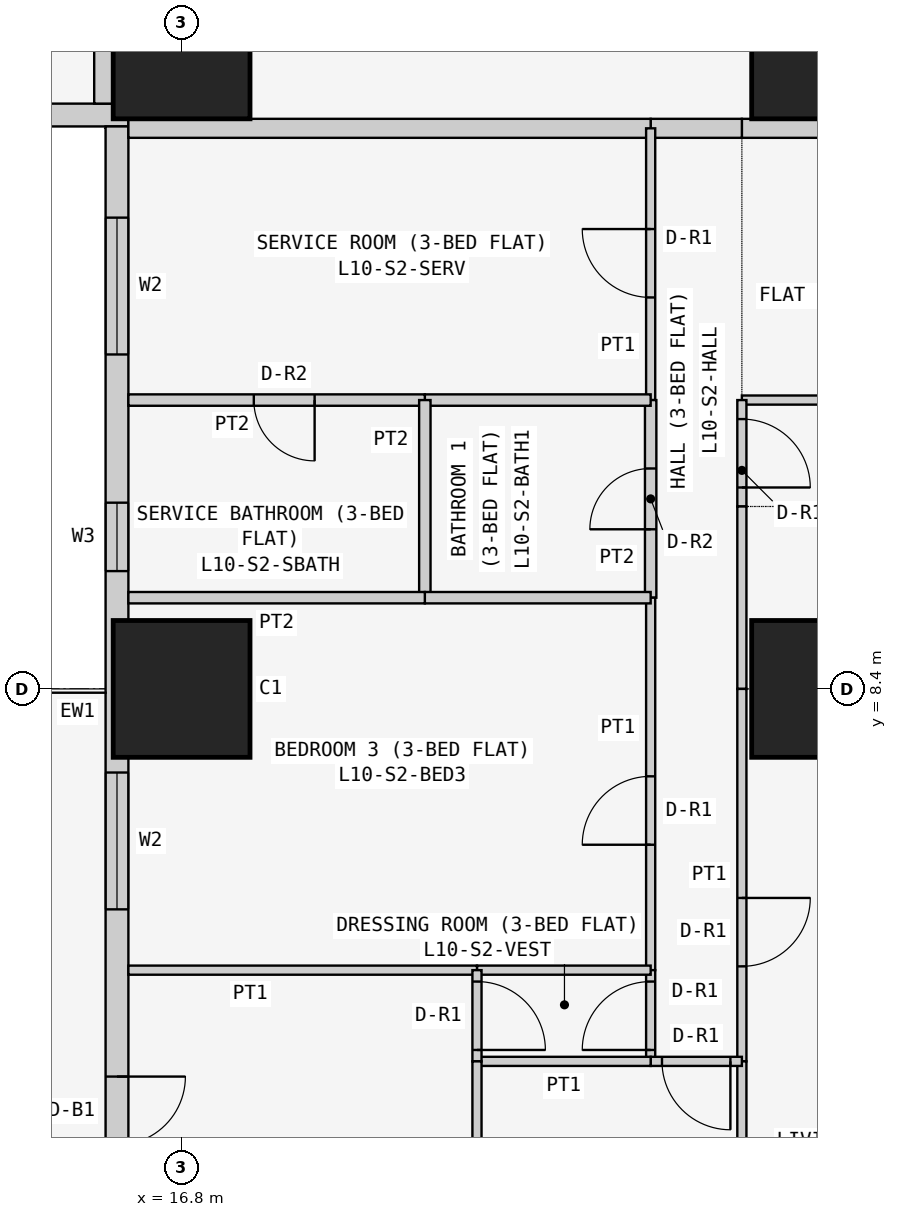
"""IFC4 building model, lengths in metres.
Left out: names, types, materials, properties, quantities, classifications, styles, units other than length and angle.
Written with IfcOpenShell. Run it as: python <this file> out.ifc"""

import sys

from ifc_helpers import new_model, si_unit, direction, frame, frame_2d, origin, origin_2d, place, context, subcontext, project, spatial, rectangle, extrude, element, fill, save


model = new_model("IFC4")
c1 = context("Model", 3, precision=1e-05, world=origin(), true_north=direction((0.0, 1.0)))
c2 = subcontext(c1, "Body", "Model", "MODEL_VIEW")
j1 = project(units=[si_unit("LENGTHUNIT", "METRE"), si_unit("PLANEANGLEUNIT", "RADIAN")], contexts=[c1])
p1 = place(None, origin())
s1 = spatial("IfcSite", under=j1, at=p1, CompositionType="ELEMENT")
p2 = place(p1, origin())
s2 = spatial("IfcBuilding", under=s1, at=p2, CompositionType="ELEMENT")
p3 = place(p2, frame((0.0, 0.0, 45.3)))
s3 = spatial("IfcBuildingStorey", under=s2, at=p3, CompositionType="ELEMENT", Elevation=45.3)
for number, where, z_axis, x_axis in (
    (1, (16.8, 8.4, 0.0), (0.0, 0.0, 1.0), (1.0, 0.0, 0.0)),
    (2, (16.8, 16.8, 0.0), (0.0, 0.0, 1.0), (1.0, 0.0, 0.0)),
    (3, (25.2, 8.4, 0.0), (0.0, 0.0, 1.0), (1.0, 0.0, 0.0)),
    (4, (25.2, 16.8, 0.0), (0.0, 0.0, 1.0), (1.0, 0.0, 0.0)),
):
    element("IfcColumn", number, at=place(p3, frame(where, z_axis=z_axis, x_axis=x_axis)), inside=s3, PredefinedType="COLUMN", context=c2, shape_type="SweptSolid", body=[
        extrude(rectangle(XDim=1.8, YDim=1.8, at=origin_2d()), origin(), (0.0, 0.0, 1.0), 3.6),
    ])
p4 = place(p3, frame((0.4, 15.95, 0.0), z_axis=(0.0, 0.0, 1.0), x_axis=(1.0, 0.0, 0.0)))
e5 = element("IfcWall", 5, at=p4, inside=s3, PredefinedType="SOLIDWALL", context=c2, shape_type="SweptSolid", body=[
    extrude(rectangle(XDim=15.7, YDim=0.3, at=frame_2d((7.85, 0.0))), origin(), (0.0, 0.0, 1.0), 3.45),
])
p5 = place(p4, frame((12.4, 0.0, 0.9)))
e6 = element("IfcOpeningElement", 6, at=p5, cuts=e5, PredefinedType="OPENING", context=c2, shape_type="SweptSolid", body=[
    extrude(rectangle(XDim=1.8, YDim=1.5, at=frame_2d((0.9, 0.75))), frame((0.0, 0.16, 0.0), z_axis=(0.0, -1.0, 0.0), x_axis=(1.0, 0.0, 0.0)), (0.0, 0.0, 1.0), 0.32),
])
p6 = place(p4, frame((9.55, 0.0, 1.5)))
e7 = element("IfcOpeningElement", 7, at=p6, cuts=e5, PredefinedType="OPENING", context=c2, shape_type="SweptSolid", body=[
    extrude(rectangle(XDim=0.9, YDim=0.7, at=frame_2d((0.45, 0.35))), frame((0.0, 0.16, 0.0), z_axis=(0.0, -1.0, 0.0), x_axis=(1.0, 0.0, 0.0)), (0.0, 0.0, 1.0), 0.32),
])
p7 = place(p4, frame((5.1, 0.0, 0.9)))
e8 = element("IfcOpeningElement", 8, at=p7, cuts=e5, PredefinedType="OPENING", context=c2, shape_type="SweptSolid", body=[
    extrude(rectangle(XDim=1.8, YDim=1.5, at=frame_2d((0.9, 0.75))), frame((0.0, 0.16, 0.0), z_axis=(0.0, -1.0, 0.0), x_axis=(1.0, 0.0, 0.0)), (0.0, 0.0, 1.0), 0.32),
])
p8 = place(p4, frame((2.0, 0.0, 0.0)))
e9 = element("IfcOpeningElement", 9, at=p8, cuts=e5, PredefinedType="OPENING", context=c2, shape_type="SweptSolid", body=[
    extrude(rectangle(XDim=0.9, YDim=2.4, at=frame_2d((0.45, 1.2))), frame((0.0, 0.16, 0.0), z_axis=(0.0, -1.0, 0.0), x_axis=(1.0, 0.0, 0.0)), (0.0, 0.0, 1.0), 0.32),
])
p9 = place(p4, frame((0.7, 0.0, 0.9)))
e10 = element("IfcOpeningElement", 10, at=p9, cuts=e5, PredefinedType="OPENING", context=c2, shape_type="SweptSolid", body=[
    extrude(rectangle(XDim=1.2, YDim=1.5, at=frame_2d((0.6, 0.75))), frame((0.0, 0.16, 0.0), z_axis=(0.0, -1.0, 0.0), x_axis=(1.0, 0.0, 0.0)), (0.0, 0.0, 1.0), 0.32),
])
p10 = place(p3, frame((15.95, 15.8, 0.0), z_axis=(0.0, 0.0, 1.0), x_axis=(0.0, -1.0, 0.0)))
e11 = element("IfcWall", 11, at=p10, inside=s3, PredefinedType="SOLIDWALL", context=c2, shape_type="SweptSolid", body=[
    extrude(rectangle(XDim=15.4, YDim=0.3, at=frame_2d((7.7, 0.0))), origin(), (0.0, 0.0, 1.0), 3.45),
])
p11 = place(p10, frame((1.2, 0.0, 0.9)))
e12 = element("IfcOpeningElement", 12, at=p11, cuts=e11, PredefinedType="OPENING", context=c2, shape_type="SweptSolid", body=[
    extrude(rectangle(XDim=1.8, YDim=1.5, at=frame_2d((0.9, 0.75))), frame((0.0, 0.16, 0.0), z_axis=(0.0, -1.0, 0.0), x_axis=(1.0, 0.0, 0.0)), (0.0, 0.0, 1.0), 0.32),
])
p12 = place(p10, frame((4.95, 0.0, 1.5)))
e13 = element("IfcOpeningElement", 13, at=p12, cuts=e11, PredefinedType="OPENING", context=c2, shape_type="SweptSolid", body=[
    extrude(rectangle(XDim=0.9, YDim=0.7, at=frame_2d((0.45, 0.35))), frame((0.0, 0.16, 0.0), z_axis=(0.0, -1.0, 0.0), x_axis=(1.0, 0.0, 0.0)), (0.0, 0.0, 1.0), 0.32),
])
p13 = place(p10, frame((8.5, 0.0, 0.9)))
e14 = element("IfcOpeningElement", 14, at=p13, cuts=e11, PredefinedType="OPENING", context=c2, shape_type="SweptSolid", body=[
    extrude(rectangle(XDim=1.8, YDim=1.5, at=frame_2d((0.9, 0.75))), frame((0.0, 0.16, 0.0), z_axis=(0.0, -1.0, 0.0), x_axis=(1.0, 0.0, 0.0)), (0.0, 0.0, 1.0), 0.32),
])
p14 = place(p10, frame((12.5, 0.0, 0.0)))
e15 = element("IfcOpeningElement", 15, at=p14, cuts=e11, PredefinedType="OPENING", context=c2, shape_type="SweptSolid", body=[
    extrude(rectangle(XDim=0.9, YDim=2.4, at=frame_2d((0.45, 1.2))), frame((0.0, 0.16, 0.0), z_axis=(0.0, -1.0, 0.0), x_axis=(1.0, 0.0, 0.0)), (0.0, 0.0, 1.0), 0.32),
])
p15 = place(p10, frame((13.5, 0.0, 0.9)))
e16 = element("IfcOpeningElement", 16, at=p15, cuts=e11, PredefinedType="OPENING", context=c2, shape_type="SweptSolid", body=[
    extrude(rectangle(XDim=1.2, YDim=1.5, at=frame_2d((0.6, 0.75))), frame((0.0, 0.16, 0.0), z_axis=(0.0, -1.0, 0.0), x_axis=(1.0, 0.0, 0.0)), (0.0, 0.0, 1.0), 0.32),
])
p16 = place(p3, frame((29.4, 15.775, 0.0), z_axis=(0.0, 0.0, 1.0), x_axis=(-1.0, 0.0, 0.0)))
e17 = element("IfcWall", 17, at=p16, inside=s3, PredefinedType="PARTITIONING", context=c2, shape_type="SweptSolid", body=[
    extrude(rectangle(XDim=5.229, YDim=0.25, at=frame_2d((2.615, 0.0))), origin(), (0.0, 0.0, 1.0), 3.45),
])
p17 = place(p16, frame((2.1, 0.0, 0.0)))
e18 = element("IfcOpeningElement", 18, at=p17, cuts=e17, PredefinedType="OPENING", context=c2, shape_type="SweptSolid", body=[
    extrude(rectangle(XDim=1.0, YDim=2.1, at=frame_2d((0.5, 1.05))), frame((0.0, 0.135, 0.0), z_axis=(0.0, -1.0, 0.0), x_axis=(1.0, 0.0, 0.0)), (0.0, 0.0, 1.0), 0.27),
])
p18 = place(p3, frame((24.171, 15.775, 0.0), z_axis=(0.0, 0.0, 1.0), x_axis=(-1.0, 0.0, 0.0)))
e19 = element("IfcWall", 19, at=p18, inside=s3, PredefinedType="PARTITIONING", context=c2, shape_type="SweptSolid", body=[
    extrude(rectangle(XDim=1.2, YDim=0.25, at=frame_2d((0.6, 0.0))), origin(), (0.0, 0.0, 1.0), 3.45),
])
for number, where, z_axis, x_axis in (
    (20, (22.971, 15.775, 0.0), (0.0, 0.0, 1.0), (-1.0, 0.0, 0.0)),
    (21, (15.775, 16.1, 0.0), (0.0, 0.0, 1.0), (0.0, 1.0, 0.0)),
):
    element("IfcWall", number, at=place(p3, frame(where, z_axis=z_axis, x_axis=x_axis)), inside=s3, PredefinedType="PARTITIONING", context=c2, shape_type="SweptSolid", body=[
        extrude(rectangle(XDim=6.871, YDim=0.25, at=frame_2d((3.436, 0.0))), origin(), (0.0, 0.0, 1.0), 3.45),
    ])
p19 = place(p3, frame((29.4, 12.2, 0.0), z_axis=(0.0, 0.0, 1.0), x_axis=(-1.0, 0.0, 0.0)))
e22 = element("IfcWall", 22, at=p19, inside=s3, PredefinedType="PARTITIONING", context=c2, shape_type="SweptSolid", body=[
    extrude(rectangle(XDim=5.229, YDim=0.12, at=frame_2d((2.615, 0.0))), origin(), (0.0, 0.0, 1.0), 3.45),
])
p20 = place(p3, frame((24.171, 10.8, 0.0), z_axis=(0.0, 0.0, 1.0), x_axis=(0.0, 1.0, 0.0)))
e23 = element("IfcWall", 23, at=p20, inside=s3, PredefinedType="PARTITIONING", context=c2, shape_type="SweptSolid", body=[
    extrude(rectangle(XDim=1.4, YDim=0.12, at=frame_2d((0.7, 0.0))), origin(), (0.0, 0.0, 1.0), 3.45),
])
p21 = place(p20, frame((0.25, 0.0, 0.0)))
e24 = element("IfcOpeningElement", 24, at=p21, cuts=e23, PredefinedType="OPENING", context=c2, shape_type="SweptSolid", body=[
    extrude(rectangle(XDim=0.9, YDim=2.1, at=frame_2d((0.45, 1.05))), frame((0.0, 0.07, 0.0), z_axis=(0.0, -1.0, 0.0), x_axis=(1.0, 0.0, 0.0)), (0.0, 0.0, 1.0), 0.14),
])
p22 = place(p3, frame((24.171, 8.4, 0.0), z_axis=(0.0, 0.0, 1.0), x_axis=(0.0, 1.0, 0.0)))
e25 = element("IfcWall", 25, at=p22, inside=s3, PredefinedType="PARTITIONING", context=c2, shape_type="SweptSolid", body=[
    extrude(rectangle(XDim=2.4, YDim=0.12, at=frame_2d((1.2, 0.0))), origin(), (0.0, 0.0, 1.0), 3.45),
])
p23 = place(p3, frame((24.171, 3.5, 0.0), z_axis=(0.0, 0.0, 1.0), x_axis=(0.0, 1.0, 0.0)))
e26 = element("IfcWall", 26, at=p23, inside=s3, PredefinedType="PARTITIONING", context=c2, shape_type="SweptSolid", body=[
    extrude(rectangle(XDim=4.9, YDim=0.12, at=frame_2d((2.45, 0.0))), origin(), (0.0, 0.0, 1.0), 3.45),
])
p24 = place(p23, frame((1.25, 0.0, 0.0)))
e27 = element("IfcOpeningElement", 27, at=p24, cuts=e26, PredefinedType="OPENING", context=c2, shape_type="SweptSolid", body=[
    extrude(rectangle(XDim=0.9, YDim=2.1, at=frame_2d((0.45, 1.05))), frame((0.0, 0.07, 0.0), z_axis=(0.0, -1.0, 0.0), x_axis=(1.0, 0.0, 0.0)), (0.0, 0.0, 1.0), 0.14),
])
p25 = place(p3, frame((24.171, -0.65, 0.0), z_axis=(0.0, 0.0, 1.0), x_axis=(0.0, 1.0, 0.0)))
e28 = element("IfcWall", 28, at=p25, inside=s3, PredefinedType="PARTITIONING", context=c2, shape_type="SweptSolid", body=[
    extrude(rectangle(XDim=4.15, YDim=0.12, at=frame_2d((2.075, 0.0))), origin(), (0.0, 0.0, 1.0), 3.45),
])
p26 = place(p3, frame((22.971, 12.2, 0.0), z_axis=(0.0, 0.0, 1.0), x_axis=(0.0, 1.0, 0.0)))
e29 = element("IfcWall", 29, at=p26, inside=s3, PredefinedType="PARTITIONING", context=c2, shape_type="SweptSolid", body=[
    extrude(rectangle(XDim=3.575, YDim=0.12, at=frame_2d((1.788, 0.0))), origin(), (0.0, 0.0, 1.0), 3.45),
])
p27 = place(p26, frame((1.35, 0.0, 0.0)))
e30 = element("IfcOpeningElement", 30, at=p27, cuts=e29, PredefinedType="OPENING", context=c2, shape_type="SweptSolid", body=[
    extrude(rectangle(XDim=0.9, YDim=2.1, at=frame_2d((0.45, 1.05))), frame((0.0, 0.07, 0.0), z_axis=(0.0, -1.0, 0.0), x_axis=(1.0, 0.0, 0.0)), (0.0, 0.0, 1.0), 0.14),
])
p28 = place(p3, frame((22.971, 9.6, 0.0), z_axis=(0.0, 0.0, 1.0), x_axis=(0.0, 1.0, 0.0)))
e31 = element("IfcWall", 31, at=p28, inside=s3, PredefinedType="PARTITIONING", context=c2, shape_type="SweptSolid", body=[
    extrude(rectangle(XDim=2.6, YDim=0.15, at=frame_2d((1.3, 0.0))), origin(), (0.0, 0.0, 1.0), 3.45),
])
p29 = place(p28, frame((0.9, 0.0, 0.0)))
e32 = element("IfcOpeningElement", 32, at=p29, cuts=e31, PredefinedType="OPENING", context=c2, shape_type="SweptSolid", body=[
    extrude(rectangle(XDim=0.8, YDim=2.1, at=frame_2d((0.4, 1.05))), frame((0.0, 0.085, 0.0), z_axis=(0.0, -1.0, 0.0), x_axis=(1.0, 0.0, 0.0)), (0.0, 0.0, 1.0), 0.17),
])
p30 = place(p3, frame((22.971, 4.7, 0.0), z_axis=(0.0, 0.0, 1.0), x_axis=(0.0, 1.0, 0.0)))
e33 = element("IfcWall", 33, at=p30, inside=s3, PredefinedType="PARTITIONING", context=c2, shape_type="SweptSolid", body=[
    extrude(rectangle(XDim=4.9, YDim=0.12, at=frame_2d((2.45, 0.0))), origin(), (0.0, 0.0, 1.0), 3.45),
])
p31 = place(p30, frame((1.65, 0.0, 0.0)))
e34 = element("IfcOpeningElement", 34, at=p31, cuts=e33, PredefinedType="OPENING", context=c2, shape_type="SweptSolid", body=[
    extrude(rectangle(XDim=0.9, YDim=2.1, at=frame_2d((0.45, 1.05))), frame((0.0, 0.07, 0.0), z_axis=(0.0, -1.0, 0.0), x_axis=(1.0, 0.0, 0.0)), (0.0, 0.0, 1.0), 0.14),
])
p32 = place(p3, frame((22.971, 3.5, 0.0), z_axis=(0.0, 0.0, 1.0), x_axis=(0.0, 1.0, 0.0)))
e35 = element("IfcWall", 35, at=p32, inside=s3, PredefinedType="PARTITIONING", context=c2, shape_type="SweptSolid", body=[
    extrude(rectangle(XDim=1.2, YDim=0.12, at=frame_2d((0.6, 0.0))), origin(), (0.0, 0.0, 1.0), 3.45),
])
p33 = place(p32, frame((0.15, 0.0, 0.0)))
e36 = element("IfcOpeningElement", 36, at=p33, cuts=e35, PredefinedType="OPENING", context=c2, shape_type="SweptSolid", body=[
    extrude(rectangle(XDim=0.9, YDim=2.1, at=frame_2d((0.45, 1.05))), frame((0.0, 0.07, 0.0), z_axis=(0.0, -1.0, 0.0), x_axis=(1.0, 0.0, 0.0)), (0.0, 0.0, 1.0), 0.14),
])
p34 = place(p3, frame((24.171, 3.5, 0.0), z_axis=(0.0, 0.0, 1.0), x_axis=(-1.0, 0.0, 0.0)))
e37 = element("IfcWall", 37, at=p34, inside=s3, PredefinedType="PARTITIONING", context=c2, shape_type="SweptSolid", body=[
    extrude(rectangle(XDim=1.2, YDim=0.12, at=frame_2d((0.6, 0.0))), origin(), (0.0, 0.0, 1.0), 3.45),
])
p35 = place(p34, frame((0.151, 0.0, 0.0)))
e38 = element("IfcOpeningElement", 38, at=p35, cuts=e37, PredefinedType="OPENING", context=c2, shape_type="SweptSolid", body=[
    extrude(rectangle(XDim=0.9, YDim=2.1, at=frame_2d((0.45, 1.05))), frame((0.0, 0.07, 0.0), z_axis=(0.0, -1.0, 0.0), x_axis=(1.0, 0.0, 0.0)), (0.0, 0.0, 1.0), 0.14),
])
p36 = place(p3, frame((22.971, 12.2, 0.0), z_axis=(0.0, 0.0, 1.0), x_axis=(-1.0, 0.0, 0.0)))
e39 = element("IfcWall", 39, at=p36, inside=s3, PredefinedType="PARTITIONING", context=c2, shape_type="SweptSolid", body=[
    extrude(rectangle(XDim=2.971, YDim=0.15, at=frame_2d((1.485, 0.0))), origin(), (0.0, 0.0, 1.0), 3.45),
])
p37 = place(p3, frame((20.0, 12.2, 0.0), z_axis=(0.0, 0.0, 1.0), x_axis=(-1.0, 0.0, 0.0)))
e40 = element("IfcWall", 40, at=p37, inside=s3, PredefinedType="PARTITIONING", context=c2, shape_type="SweptSolid", body=[
    extrude(rectangle(XDim=3.9, YDim=0.15, at=frame_2d((1.95, 0.0))), origin(), (0.0, 0.0, 1.0), 3.45),
])
p38 = place(p37, frame((1.45, 0.0, 0.0)))
e41 = element("IfcOpeningElement", 41, at=p38, cuts=e40, PredefinedType="OPENING", context=c2, shape_type="SweptSolid", body=[
    extrude(rectangle(XDim=0.8, YDim=2.1, at=frame_2d((0.4, 1.05))), frame((0.0, 0.085, 0.0), z_axis=(0.0, -1.0, 0.0), x_axis=(1.0, 0.0, 0.0)), (0.0, 0.0, 1.0), 0.17),
])
p39 = place(p3, frame((20.0, 9.6, 0.0), z_axis=(0.0, 0.0, 1.0), x_axis=(0.0, 1.0, 0.0)))
e42 = element("IfcWall", 42, at=p39, inside=s3, PredefinedType="PARTITIONING", context=c2, shape_type="SweptSolid", body=[
    extrude(rectangle(XDim=2.6, YDim=0.15, at=frame_2d((1.3, 0.0))), origin(), (0.0, 0.0, 1.0), 3.45),
])
p40 = place(p3, frame((22.971, 9.6, 0.0), z_axis=(0.0, 0.0, 1.0), x_axis=(-1.0, 0.0, 0.0)))
e43 = element("IfcWall", 43, at=p40, inside=s3, PredefinedType="PARTITIONING", context=c2, shape_type="SweptSolid", body=[
    extrude(rectangle(XDim=2.971, YDim=0.15, at=frame_2d((1.485, 0.0))), origin(), (0.0, 0.0, 1.0), 3.45),
])
p41 = place(p3, frame((20.0, 9.6, 0.0), z_axis=(0.0, 0.0, 1.0), x_axis=(-1.0, 0.0, 0.0)))
e44 = element("IfcWall", 44, at=p41, inside=s3, PredefinedType="PARTITIONING", context=c2, shape_type="SweptSolid", body=[
    extrude(rectangle(XDim=3.9, YDim=0.15, at=frame_2d((1.95, 0.0))), origin(), (0.0, 0.0, 1.0), 3.45),
])
p42 = place(p3, frame((22.971, 4.7, 0.0), z_axis=(0.0, 0.0, 1.0), x_axis=(-1.0, 0.0, 0.0)))
e45 = element("IfcWall", 45, at=p42, inside=s3, PredefinedType="PARTITIONING", context=c2, shape_type="SweptSolid", body=[
    extrude(rectangle(XDim=2.285, YDim=0.12, at=frame_2d((1.143, 0.0))), origin(), (0.0, 0.0, 1.0), 3.45),
])
p43 = place(p3, frame((20.686, 4.7, 0.0), z_axis=(0.0, 0.0, 1.0), x_axis=(-1.0, 0.0, 0.0)))
e46 = element("IfcWall", 46, at=p43, inside=s3, PredefinedType="PARTITIONING", context=c2, shape_type="SweptSolid", body=[
    extrude(rectangle(XDim=4.586, YDim=0.12, at=frame_2d((2.293, 0.0))), origin(), (0.0, 0.0, 1.0), 3.45),
])
p44 = place(p3, frame((22.971, 3.5, 0.0), z_axis=(0.0, 0.0, 1.0), x_axis=(-1.0, 0.0, 0.0)))
e47 = element("IfcWall", 47, at=p44, inside=s3, PredefinedType="PARTITIONING", context=c2, shape_type="SweptSolid", body=[
    extrude(rectangle(XDim=2.285, YDim=0.12, at=frame_2d((1.143, 0.0))), origin(), (0.0, 0.0, 1.0), 3.45),
])
p45 = place(p3, frame((20.686, 3.5, 0.0), z_axis=(0.0, 0.0, 1.0), x_axis=(0.0, 1.0, 0.0)))
e48 = element("IfcWall", 48, at=p45, inside=s3, PredefinedType="PARTITIONING", context=c2, shape_type="SweptSolid", body=[
    extrude(rectangle(XDim=1.2, YDim=0.12, at=frame_2d((0.6, 0.0))), origin(), (0.0, 0.0, 1.0), 3.45),
])
p46 = place(p45, frame((0.15, 0.0, 0.0)))
e49 = element("IfcOpeningElement", 49, at=p46, cuts=e48, PredefinedType="OPENING", context=c2, shape_type="SweptSolid", body=[
    extrude(rectangle(XDim=0.9, YDim=2.1, at=frame_2d((0.45, 1.05))), frame((0.0, 0.07, 0.0), z_axis=(0.0, -1.0, 0.0), x_axis=(1.0, 0.0, 0.0)), (0.0, 0.0, 1.0), 0.14),
])
p47 = place(p3, frame((20.686, -0.65, 0.0), z_axis=(0.0, 0.0, 1.0), x_axis=(0.0, 1.0, 0.0)))
e50 = element("IfcWall", 50, at=p47, inside=s3, PredefinedType="PARTITIONING", context=c2, shape_type="SweptSolid", body=[
    extrude(rectangle(XDim=4.15, YDim=0.12, at=frame_2d((2.075, 0.0))), origin(), (0.0, 0.0, 1.0), 3.45),
])
p48 = place(p11, origin())
e51 = element("IfcWindow", 51, at=p48, inside=s3, PartitioningType="SINGLE_PANEL", PredefinedType="WINDOW", context=c2, shape_type="SweptSolid", body=[
    extrude(rectangle(XDim=1.8, YDim=1.5, at=frame_2d((0.9, 0.75))), frame((0.0, 0.03, 0.0), z_axis=(0.0, -1.0, 0.0), x_axis=(1.0, 0.0, 0.0)), (0.0, 0.0, 1.0), 0.06),
])
fill(e12, e51)
p49 = place(p12, origin())
e52 = element("IfcWindow", 52, at=p49, inside=s3, PartitioningType="SINGLE_PANEL", PredefinedType="WINDOW", context=c2, shape_type="SweptSolid", body=[
    extrude(rectangle(XDim=0.9, YDim=0.7, at=frame_2d((0.45, 0.35))), frame((0.0, 0.03, 0.0), z_axis=(0.0, -1.0, 0.0), x_axis=(1.0, 0.0, 0.0)), (0.0, 0.0, 1.0), 0.06),
])
fill(e13, e52)
p50 = place(p13, origin())
e53 = element("IfcWindow", 53, at=p50, inside=s3, PartitioningType="SINGLE_PANEL", PredefinedType="WINDOW", context=c2, shape_type="SweptSolid", body=[
    extrude(rectangle(XDim=1.8, YDim=1.5, at=frame_2d((0.9, 0.75))), frame((0.0, 0.03, 0.0), z_axis=(0.0, -1.0, 0.0), x_axis=(1.0, 0.0, 0.0)), (0.0, 0.0, 1.0), 0.06),
])
fill(e14, e53)
p51 = place(p14, origin())
e54 = element("IfcDoor", 54, at=p51, inside=s3, OperationType="SINGLE_SWING_LEFT", PredefinedType="DOOR", context=c2, shape_type="SweptSolid", body=[
    extrude(rectangle(XDim=0.9, YDim=2.4, at=frame_2d((0.45, 1.2))), frame((0.0, 0.025, 0.0), z_axis=(0.0, -1.0, 0.0), x_axis=(1.0, 0.0, 0.0)), (0.0, 0.0, 1.0), 0.05),
])
fill(e15, e54)
p52 = place(p21, frame((0.9, 0.0, 0.0), z_axis=(0.0, 0.0, 1.0), x_axis=(-1.0, 0.0, 0.0)))
e55 = element("IfcDoor", 55, at=p52, inside=s3, OperationType="SINGLE_SWING_RIGHT", PredefinedType="DOOR", context=c2, shape_type="SweptSolid", body=[
    extrude(rectangle(XDim=0.9, YDim=2.1, at=frame_2d((0.45, 1.05))), frame((0.0, 0.025, 0.0), z_axis=(0.0, -1.0, 0.0), x_axis=(1.0, 0.0, 0.0)), (0.0, 0.0, 1.0), 0.05),
])
fill(e24, e55)
p53 = place(p24, frame((0.9, 0.0, 0.0), z_axis=(0.0, 0.0, 1.0), x_axis=(-1.0, 0.0, 0.0)))
e56 = element("IfcDoor", 56, at=p53, inside=s3, OperationType="SINGLE_SWING_LEFT", PredefinedType="DOOR", context=c2, shape_type="SweptSolid", body=[
    extrude(rectangle(XDim=0.9, YDim=2.1, at=frame_2d((0.45, 1.05))), frame((0.0, 0.025, 0.0), z_axis=(0.0, -1.0, 0.0), x_axis=(1.0, 0.0, 0.0)), (0.0, 0.0, 1.0), 0.05),
])
fill(e27, e56)
p54 = place(p27, origin())
e57 = element("IfcDoor", 57, at=p54, inside=s3, OperationType="SINGLE_SWING_RIGHT", PredefinedType="DOOR", context=c2, shape_type="SweptSolid", body=[
    extrude(rectangle(XDim=0.9, YDim=2.1, at=frame_2d((0.45, 1.05))), frame((0.0, 0.025, 0.0), z_axis=(0.0, -1.0, 0.0), x_axis=(1.0, 0.0, 0.0)), (0.0, 0.0, 1.0), 0.05),
])
fill(e30, e57)
p55 = place(p38, origin())
e58 = element("IfcDoor", 58, at=p55, inside=s3, OperationType="SINGLE_SWING_LEFT", PredefinedType="DOOR", context=c2, shape_type="SweptSolid", body=[
    extrude(rectangle(XDim=0.8, YDim=2.1, at=frame_2d((0.4, 1.05))), frame((0.0, 0.025, 0.0), z_axis=(0.0, -1.0, 0.0), x_axis=(1.0, 0.0, 0.0)), (0.0, 0.0, 1.0), 0.05),
])
fill(e41, e58)
p56 = place(p29, origin())
e59 = element("IfcDoor", 59, at=p56, inside=s3, OperationType="SINGLE_SWING_LEFT", PredefinedType="DOOR", context=c2, shape_type="SweptSolid", body=[
    extrude(rectangle(XDim=0.8, YDim=2.1, at=frame_2d((0.4, 1.05))), frame((0.0, 0.025, 0.0), z_axis=(0.0, -1.0, 0.0), x_axis=(1.0, 0.0, 0.0)), (0.0, 0.0, 1.0), 0.05),
])
fill(e32, e59)
p57 = place(p31, origin())
e60 = element("IfcDoor", 60, at=p57, inside=s3, OperationType="SINGLE_SWING_LEFT", PredefinedType="DOOR", context=c2, shape_type="SweptSolid", body=[
    extrude(rectangle(XDim=0.9, YDim=2.1, at=frame_2d((0.45, 1.05))), frame((0.0, 0.025, 0.0), z_axis=(0.0, -1.0, 0.0), x_axis=(1.0, 0.0, 0.0)), (0.0, 0.0, 1.0), 0.05),
])
fill(e34, e60)
p58 = place(p33, origin())
e61 = element("IfcDoor", 61, at=p58, inside=s3, OperationType="SINGLE_SWING_LEFT", PredefinedType="DOOR", context=c2, shape_type="SweptSolid", body=[
    extrude(rectangle(XDim=0.9, YDim=2.1, at=frame_2d((0.45, 1.05))), frame((0.0, 0.025, 0.0), z_axis=(0.0, -1.0, 0.0), x_axis=(1.0, 0.0, 0.0)), (0.0, 0.0, 1.0), 0.05),
])
fill(e36, e61)
p59 = place(p46, frame((0.9, 0.0, 0.0), z_axis=(0.0, 0.0, 1.0), x_axis=(-1.0, 0.0, 0.0)))
e62 = element("IfcDoor", 62, at=p59, inside=s3, OperationType="SINGLE_SWING_RIGHT", PredefinedType="DOOR", context=c2, shape_type="SweptSolid", body=[
    extrude(rectangle(XDim=0.9, YDim=2.1, at=frame_2d((0.45, 1.05))), frame((0.0, 0.025, 0.0), z_axis=(0.0, -1.0, 0.0), x_axis=(1.0, 0.0, 0.0)), (0.0, 0.0, 1.0), 0.05),
])
fill(e49, e62)
p60 = place(p35, origin())
e63 = element("IfcDoor", 63, at=p60, inside=s3, OperationType="SINGLE_SWING_LEFT", PredefinedType="DOOR", context=c2, shape_type="SweptSolid", body=[
    extrude(rectangle(XDim=0.9, YDim=2.1, at=frame_2d((0.45, 1.05))), frame((0.0, 0.025, 0.0), z_axis=(0.0, -1.0, 0.0), x_axis=(1.0, 0.0, 0.0)), (0.0, 0.0, 1.0), 0.05),
])
fill(e38, e63)
save(model, sys.argv[1])
